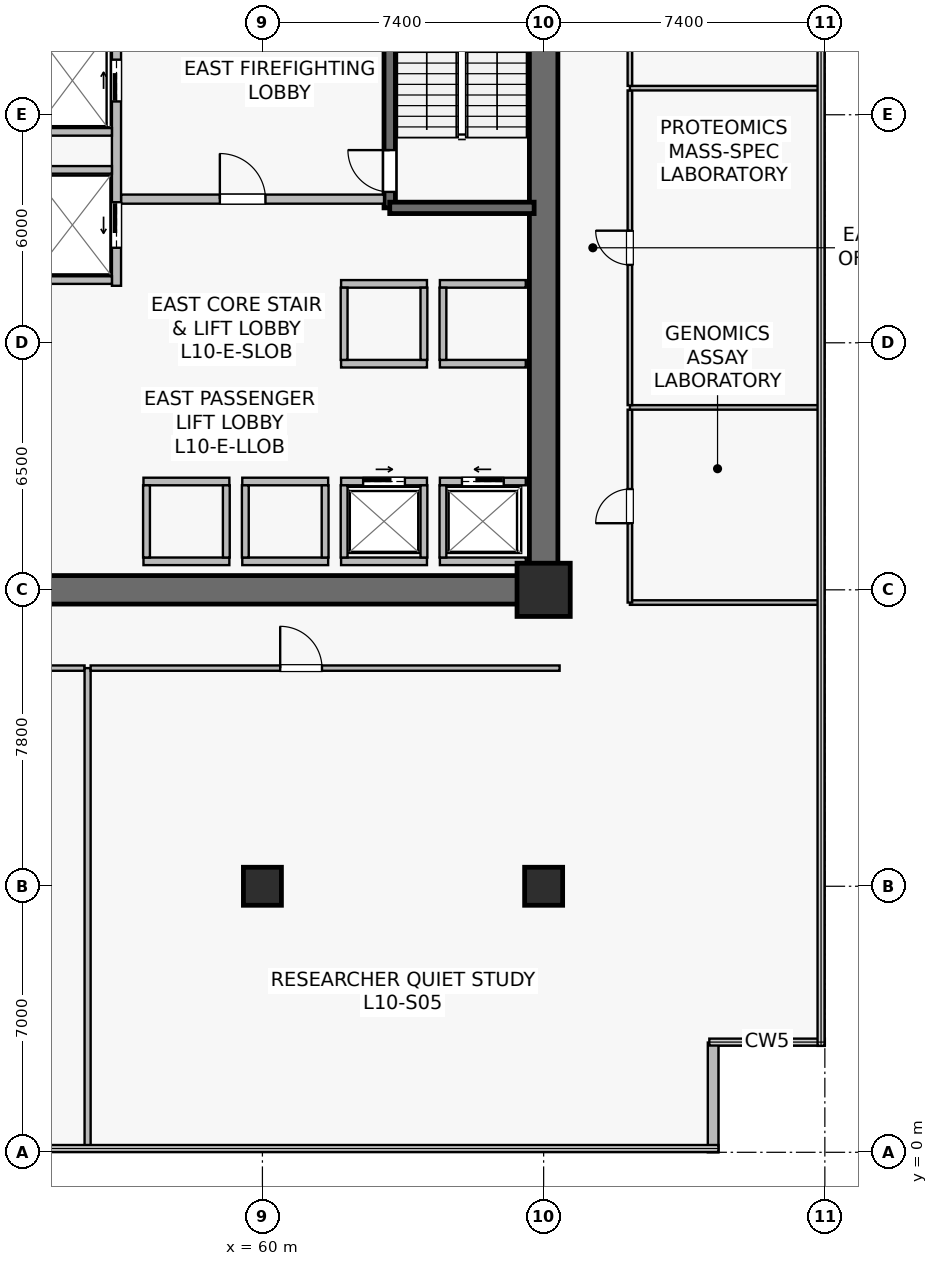
"""IFC4 building model, lengths in metres.
Left out: names, types, materials, properties, quantities, classifications, styles, units other than length and angle.
Written with IfcOpenShell. Run it as: python <this file> out.ifc"""

import sys

from ifc_helpers import new_model, si_unit, direction, frame, frame_2d, origin, origin_2d, place, context, subcontext, project, spatial, rectangle, extrude, source, transform, mapped, element, fill, save


model = new_model("IFC4")
c1 = context("Model", 3, precision=1e-05, world=origin(), true_north=direction((0.0, 1.0)))
c2 = subcontext(c1, "Body", "Model", "MODEL_VIEW")
j1 = project(units=[si_unit("LENGTHUNIT", "METRE"), si_unit("PLANEANGLEUNIT", "RADIAN")], contexts=[c1])
p1 = place(None, origin())
s1 = spatial("IfcSite", under=j1, at=p1, CompositionType="ELEMENT")
p2 = place(p1, origin())
s2 = spatial("IfcBuilding", under=s1, at=p2, CompositionType="ELEMENT")
p3 = place(p2, frame((0.0, 0.0, 41.6)))
s3 = spatial("IfcBuildingStorey", under=s2, at=p3, CompositionType="ELEMENT", Elevation=41.6)
p4 = place(p3, frame((52.225, 14.8, 0.0), z_axis=(0.0, 0.0, 1.0), x_axis=(1.0, 0.0, 0.0)))
e1 = element("IfcWall", 1, at=p4, inside=s3, PredefinedType="SHEAR", context=c2, shape_type="SweptSolid", body=[
    extrude(rectangle(XDim=15.55, YDim=0.75, at=frame_2d((7.775, 0.0))), origin(), (0.0, 0.0, 1.0), 3.78),
])
p5 = place(p3, frame((67.4, 15.175, 0.0), z_axis=(0.0, 0.0, 1.0), x_axis=(0.0, 1.0, 0.0)))
e2 = element("IfcWall", 2, at=p5, inside=s3, PredefinedType="SHEAR", context=c2, shape_type="SweptSolid", body=[
    extrude(rectangle(XDim=18.25, YDim=0.75, at=frame_2d((9.125, 0.0))), origin(), (0.0, 0.0, 1.0), 3.78),
])
p6 = place(p3, frame((63.35, 24.85, 0.0), z_axis=(0.0, 0.0, 1.0), x_axis=(0.0, 1.0, 0.0)))
e3 = element("IfcWall", 3, at=p6, inside=s3, PredefinedType="SHEAR", context=c2, shape_type="SweptSolid", body=[
    extrude(rectangle(XDim=8.63, YDim=0.3, at=frame_2d((4.315, 0.0))), origin(), (0.0, 0.0, 1.0), 3.78),
])
p7 = place(p6, frame((0.42, 0.0, 0.0)))
e4 = element("IfcOpeningElement", 4, at=p7, cuts=e3, PredefinedType="OPENING", context=c2, shape_type="SweptSolid", body=[
    extrude(rectangle(XDim=1.1, YDim=2.15, at=frame_2d((0.55, 1.075))), frame((0.0, 0.16, 0.0), z_axis=(0.0, -1.0, 0.0), x_axis=(1.0, 0.0, 0.0)), (0.0, 0.0, 1.0), 0.32),
])
p8 = place(p3, frame((63.35, 24.85, 0.0), z_axis=(0.0, 0.0, 1.0), x_axis=(1.0, 0.0, 0.0)))
e5 = element("IfcWall", 5, at=p8, inside=s3, PredefinedType="SHEAR", context=c2, shape_type="SweptSolid", body=[
    extrude(rectangle(XDim=3.8, YDim=0.3, at=frame_2d((1.9, 0.0))), origin(), (0.0, 0.0, 1.0), 3.78),
])
m1 = source(origin(), c2, "Body", "SweptSolid", [
    extrude(rectangle(XDim=1.0, YDim=1.0, at=origin_2d()), origin(), (0.0, 0.0, 1.0), 4.1),
])
p9 = place(p3, frame((60.0, 7.0, 0.0), z_axis=(0.0, 0.0, 1.0), x_axis=(1.0, 0.0, 0.0)))
e6 = element("IfcColumn", 6, at=p9, inside=s3, PredefinedType="COLUMN", context=c2, shape_type="MappedRepresentation", body=[
    mapped(m1, transform((0.0, 0.0, 0.0), scale=1.0)),
])
m2 = source(origin(), c2, "Body", "SweptSolid", [
    extrude(rectangle(XDim=1.4, YDim=1.4, at=origin_2d()), origin(), (0.0, 0.0, 1.0), 4.1),
])
p10 = place(p3, frame((67.4, 14.8, 0.0), z_axis=(0.0, 0.0, 1.0), x_axis=(1.0, 0.0, 0.0)))
e7 = element("IfcColumn", 7, at=p10, inside=s3, PredefinedType="COLUMN", context=c2, shape_type="MappedRepresentation", body=[
    mapped(m2, transform((0.0, 0.0, 0.0), scale=1.0)),
])
p11 = place(p3, frame((67.4, 7.0, 0.0), z_axis=(0.0, 0.0, 1.0), x_axis=(1.0, 0.0, 0.0)))
e8 = element("IfcColumn", 8, at=p11, inside=s3, PredefinedType="COLUMN", context=c2, shape_type="MappedRepresentation", body=[
    mapped(m1, transform((0.0, 0.0, 0.0), scale=1.0)),
])
p12 = place(p3, frame((71.86, 0.0, 0.0), z_axis=(0.0, 0.0, 1.0), x_axis=(0.0, 1.0, 0.0)))
e9 = element("IfcWall", 9, at=p12, inside=s3, PredefinedType="STANDARD", context=c2, shape_type="SweptSolid", body=[
    extrude(rectangle(XDim=2.888, YDim=0.28, at=frame_2d((1.444, 0.0))), origin(), (0.0, 0.0, 1.0), 3.78),
])
p13 = place(p3, frame((56.28, 25.08, 0.0), z_axis=(0.0, 0.0, 1.0), x_axis=(1.0, 0.0, 0.0)))
e10 = element("IfcWall", 10, at=p13, inside=s3, PredefinedType="SOLIDWALL", context=c2, shape_type="SweptSolid", body=[
    extrude(rectangle(XDim=6.92, YDim=0.24, at=frame_2d((3.46, 0.0))), origin(), (0.0, 0.0, 1.0), 3.065),
])
p14 = place(p13, frame((2.6, 0.0, 0.0)))
e11 = element("IfcOpeningElement", 11, at=p14, cuts=e10, PredefinedType="OPENING", context=c2, shape_type="SweptSolid", body=[
    extrude(rectangle(XDim=1.2, YDim=2.16, at=frame_2d((0.6, 1.08))), frame((0.0, 0.13, 0.0), z_axis=(0.0, -1.0, 0.0), x_axis=(1.0, 0.0, 0.0)), (0.0, 0.0, 1.0), 0.26),
])
p15 = place(p3, frame((56.16, 22.8, 0.0), z_axis=(0.0, 0.0, 1.0), x_axis=(0.0, 1.0, 0.0)))
e12 = element("IfcWall", 12, at=p15, inside=s3, PredefinedType="SOLIDWALL", context=c2, shape_type="SweptSolid", body=[
    extrude(rectangle(XDim=6.85, YDim=0.24, at=frame_2d((3.425, 0.0))), origin(), (0.0, 0.0, 1.0), 2.865),
])
p16 = place(p15, frame((4.85, 0.0, 0.0)))
e13 = element("IfcOpeningElement", 13, at=p16, cuts=e12, PredefinedType="OPENING", context=c2, shape_type="SweptSolid", body=[
    extrude(rectangle(XDim=1.1, YDim=2.22, at=frame_2d((0.55, 1.11))), frame((0.0, 0.13, 0.0), z_axis=(0.0, -1.0, 0.0), x_axis=(1.0, 0.0, 0.0)), (0.0, 0.0, 1.0), 0.26),
])
p17 = place(p15, frame((1.0, 0.0, 0.0)))
e14 = element("IfcOpeningElement", 14, at=p17, cuts=e12, PredefinedType="OPENING", context=c2, shape_type="SweptSolid", body=[
    extrude(rectangle(XDim=1.2, YDim=2.22, at=frame_2d((0.6, 1.11))), frame((0.0, 0.13, 0.0), z_axis=(0.0, -1.0, 0.0), x_axis=(1.0, 0.0, 0.0)), (0.0, 0.0, 1.0), 0.26),
])
p18 = place(p3, frame((64.67, 17.65, 0.0), z_axis=(0.0, 0.0, 1.0), x_axis=(1.0, 0.0, 0.0)))
e15 = element("IfcWall", 15, at=p18, inside=s3, PredefinedType="SOLIDWALL", context=c2, shape_type="SweptSolid", body=[
    extrude(rectangle(XDim=2.26, YDim=0.2, at=frame_2d((1.13, 0.0))), origin(), (0.0, 0.0, 1.0), 3.78),
])
p19 = place(p18, frame((0.58, 0.0, 0.0)))
e16 = element("IfcOpeningElement", 16, at=p19, cuts=e15, PredefinedType="OPENING", context=c2, shape_type="SweptSolid", body=[
    extrude(rectangle(XDim=1.1, YDim=2.22, at=frame_2d((0.55, 1.11))), frame((0.0, 0.11, 0.0), z_axis=(0.0, -1.0, 0.0), x_axis=(1.0, 0.0, 0.0)), (0.0, 0.0, 1.0), 0.22),
])
p20 = place(p3, frame((64.67, 15.55, 0.0), z_axis=(0.0, 0.0, 1.0), x_axis=(1.0, 0.0, 0.0)))
e17 = element("IfcWall", 17, at=p20, inside=s3, PredefinedType="SOLIDWALL", context=c2, shape_type="SweptSolid", body=[
    extrude(rectangle(XDim=2.26, YDim=0.2, at=frame_2d((1.13, 0.0))), origin(), (0.0, 0.0, 1.0), 3.78),
])
p21 = place(p3, frame((64.75, 15.65, 0.0), z_axis=(0.0, 0.0, 1.0), x_axis=(0.0, 1.0, 0.0)))
e18 = element("IfcWall", 18, at=p21, inside=s3, PredefinedType="SOLIDWALL", context=c2, shape_type="SweptSolid", body=[
    extrude(rectangle(XDim=1.9, YDim=0.18, at=frame_2d((0.95, 0.0))), origin(), (0.0, 0.0, 1.0), 3.78),
])
p22 = place(p3, frame((62.07, 17.65, 0.0), z_axis=(0.0, 0.0, 1.0), x_axis=(1.0, 0.0, 0.0)))
e19 = element("IfcWall", 19, at=p22, inside=s3, PredefinedType="SOLIDWALL", context=c2, shape_type="SweptSolid", body=[
    extrude(rectangle(XDim=2.26, YDim=0.2, at=frame_2d((1.13, 0.0))), origin(), (0.0, 0.0, 1.0), 3.78),
])
p23 = place(p22, frame((0.58, 0.0, 0.0)))
e20 = element("IfcOpeningElement", 20, at=p23, cuts=e19, PredefinedType="OPENING", context=c2, shape_type="SweptSolid", body=[
    extrude(rectangle(XDim=1.1, YDim=2.22, at=frame_2d((0.55, 1.11))), frame((0.0, 0.11, 0.0), z_axis=(0.0, -1.0, 0.0), x_axis=(1.0, 0.0, 0.0)), (0.0, 0.0, 1.0), 0.22),
])
p24 = place(p3, frame((62.07, 15.55, 0.0), z_axis=(0.0, 0.0, 1.0), x_axis=(1.0, 0.0, 0.0)))
e21 = element("IfcWall", 21, at=p24, inside=s3, PredefinedType="SOLIDWALL", context=c2, shape_type="SweptSolid", body=[
    extrude(rectangle(XDim=2.26, YDim=0.2, at=frame_2d((1.13, 0.0))), origin(), (0.0, 0.0, 1.0), 3.78),
])
for number, where, z_axis, x_axis in (
    (22, (62.15, 15.65, 0.0), (0.0, 0.0, 1.0), (0.0, 1.0, 0.0)),
    (23, (64.25, 15.65, 0.0), (0.0, 0.0, 1.0), (0.0, 1.0, 0.0)),
):
    element("IfcWall", number, at=place(p3, frame(where, z_axis=z_axis, x_axis=x_axis)), inside=s3, PredefinedType="SOLIDWALL", context=c2, shape_type="SweptSolid", body=[
        extrude(rectangle(XDim=1.9, YDim=0.18, at=frame_2d((0.95, 0.0))), origin(), (0.0, 0.0, 1.0), 3.78),
    ])
for number, where, z_axis, x_axis in (
    (24, (59.47, 17.65, 0.0), (0.0, 0.0, 1.0), (1.0, 0.0, 0.0)),
    (25, (59.47, 15.55, 0.0), (0.0, 0.0, 1.0), (1.0, 0.0, 0.0)),
):
    element("IfcWall", number, at=place(p3, frame(where, z_axis=z_axis, x_axis=x_axis)), inside=s3, PredefinedType="SOLIDWALL", context=c2, shape_type="SweptSolid", body=[
        extrude(rectangle(XDim=2.26, YDim=0.2, at=frame_2d((1.13, 0.0))), origin(), (0.0, 0.0, 1.0), 3.065),
    ])
for number, where, z_axis, x_axis in (
    (26, (59.55, 15.65, 0.0), (0.0, 0.0, 1.0), (0.0, 1.0, 0.0)),
    (27, (61.65, 15.65, 0.0), (0.0, 0.0, 1.0), (0.0, 1.0, 0.0)),
):
    element("IfcWall", number, at=place(p3, frame(where, z_axis=z_axis, x_axis=x_axis)), inside=s3, PredefinedType="SOLIDWALL", context=c2, shape_type="SweptSolid", body=[
        extrude(rectangle(XDim=1.9, YDim=0.18, at=frame_2d((0.95, 0.0))), origin(), (0.0, 0.0, 1.0), 3.78),
    ])
for number, where, z_axis, x_axis in (
    (28, (56.87, 17.65, 0.0), (0.0, 0.0, 1.0), (1.0, 0.0, 0.0)),
    (29, (56.87, 15.55, 0.0), (0.0, 0.0, 1.0), (1.0, 0.0, 0.0)),
):
    element("IfcWall", number, at=place(p3, frame(where, z_axis=z_axis, x_axis=x_axis)), inside=s3, PredefinedType="SOLIDWALL", context=c2, shape_type="SweptSolid", body=[
        extrude(rectangle(XDim=2.26, YDim=0.2, at=frame_2d((1.13, 0.0))), origin(), (0.0, 0.0, 1.0), 3.78),
    ])
for number, where, z_axis, x_axis in (
    (30, (56.95, 15.65, 0.0), (0.0, 0.0, 1.0), (0.0, 1.0, 0.0)),
    (31, (59.05, 15.65, 0.0), (0.0, 0.0, 1.0), (0.0, 1.0, 0.0)),
):
    element("IfcWall", number, at=place(p3, frame(where, z_axis=z_axis, x_axis=x_axis)), inside=s3, PredefinedType="SOLIDWALL", context=c2, shape_type="SweptSolid", body=[
        extrude(rectangle(XDim=1.9, YDim=0.18, at=frame_2d((0.95, 0.0))), origin(), (0.0, 0.0, 1.0), 3.78),
    ])
for number, where, z_axis, x_axis in (
    (32, (64.67, 20.75, 0.0), (0.0, 0.0, 1.0), (1.0, 0.0, 0.0)),
    (33, (64.67, 22.85, 0.0), (0.0, 0.0, 1.0), (1.0, 0.0, 0.0)),
):
    element("IfcWall", number, at=place(p3, frame(where, z_axis=z_axis, x_axis=x_axis)), inside=s3, PredefinedType="SOLIDWALL", context=c2, shape_type="SweptSolid", body=[
        extrude(rectangle(XDim=2.26, YDim=0.2, at=frame_2d((1.13, 0.0))), origin(), (0.0, 0.0, 1.0), 3.78),
    ])
p25 = place(p3, frame((64.75, 20.85, 0.0), z_axis=(0.0, 0.0, 1.0), x_axis=(0.0, 1.0, 0.0)))
e34 = element("IfcWall", 34, at=p25, inside=s3, PredefinedType="SOLIDWALL", context=c2, shape_type="SweptSolid", body=[
    extrude(rectangle(XDim=1.9, YDim=0.18, at=frame_2d((0.95, 0.0))), origin(), (0.0, 0.0, 1.0), 3.78),
])
for number, where, z_axis, x_axis in (
    (35, (62.07, 20.75, 0.0), (0.0, 0.0, 1.0), (1.0, 0.0, 0.0)),
    (36, (62.07, 22.85, 0.0), (0.0, 0.0, 1.0), (1.0, 0.0, 0.0)),
):
    element("IfcWall", number, at=place(p3, frame(where, z_axis=z_axis, x_axis=x_axis)), inside=s3, PredefinedType="SOLIDWALL", context=c2, shape_type="SweptSolid", body=[
        extrude(rectangle(XDim=2.26, YDim=0.2, at=frame_2d((1.13, 0.0))), origin(), (0.0, 0.0, 1.0), 3.78),
    ])
for number, where, z_axis, x_axis in (
    (37, (62.15, 20.85, 0.0), (0.0, 0.0, 1.0), (0.0, 1.0, 0.0)),
    (38, (64.25, 20.85, 0.0), (0.0, 0.0, 1.0), (0.0, 1.0, 0.0)),
):
    element("IfcWall", number, at=place(p3, frame(where, z_axis=z_axis, x_axis=x_axis)), inside=s3, PredefinedType="SOLIDWALL", context=c2, shape_type="SweptSolid", body=[
        extrude(rectangle(XDim=1.9, YDim=0.18, at=frame_2d((0.95, 0.0))), origin(), (0.0, 0.0, 1.0), 3.78),
    ])
p26 = place(p3, frame((53.85, 26.85, 0.0), z_axis=(0.0, 0.0, 1.0), x_axis=(1.0, 0.0, 0.0)))
e39 = element("IfcWall", 39, at=p26, inside=s3, PredefinedType="SOLIDWALL", context=c2, shape_type="SweptSolid", body=[
    extrude(rectangle(XDim=2.19, YDim=0.2, at=frame_2d((1.095, 0.0))), origin(), (0.0, 0.0, 1.0), 3.177),
])
for number, where, z_axis, x_axis in (
    (40, (53.85, 25.85, 0.0), (0.0, 0.0, 1.0), (1.0, 0.0, 0.0)),
    (41, (53.85, 22.95, 0.0), (0.0, 0.0, 1.0), (1.0, 0.0, 0.0)),
):
    element("IfcWall", number, at=place(p3, frame(where, z_axis=z_axis, x_axis=x_axis)), inside=s3, PredefinedType="SOLIDWALL", context=c2, shape_type="SweptSolid", body=[
        extrude(rectangle(XDim=2.19, YDim=0.2, at=frame_2d((1.095, 0.0))), origin(), (0.0, 0.0, 1.0), 3.78),
    ])
p27 = place(p3, frame((38.88, 12.74, 0.0), z_axis=(0.0, 0.0, 1.0), x_axis=(1.0, 0.0, 0.0)))
e42 = element("IfcWall", 42, at=p27, inside=s3, PredefinedType="PARTITIONING", context=c2, shape_type="SweptSolid", body=[
    extrude(rectangle(XDim=16.44, YDim=0.14, at=frame_2d((8.22, 0.0))), origin(), (0.0, 0.0, 1.0), 3.065),
])
p28 = place(p27, frame((8.548, 0.0, 0.0)))
e43 = element("IfcOpeningElement", 43, at=p28, cuts=e42, PredefinedType="OPENING", context=c2, shape_type="SweptSolid", body=[
    extrude(rectangle(XDim=1.1, YDim=2.18, at=frame_2d((0.55, 1.09))), frame((0.0, 0.08, 0.0), z_axis=(0.0, -1.0, 0.0), x_axis=(1.0, 0.0, 0.0)), (0.0, 0.0, 1.0), 0.16),
])
p29 = place(p3, frame((55.4, 0.11, 0.0), z_axis=(0.0, 0.0, 1.0), x_axis=(0.0, 1.0, 0.0)))
e44 = element("IfcWall", 44, at=p29, inside=s3, PredefinedType="PARTITIONING", context=c2, shape_type="SweptSolid", body=[
    extrude(rectangle(XDim=12.63, YDim=0.16, at=frame_2d((6.315, 0.0))), origin(), (0.0, 0.0, 1.0), 3.015),
])
p30 = place(p3, frame((55.48, 12.74, 0.0), z_axis=(0.0, 0.0, 1.0), x_axis=(1.0, 0.0, 0.0)))
e45 = element("IfcWall", 45, at=p30, inside=s3, PredefinedType="PARTITIONING", context=c2, shape_type="SweptSolid", body=[
    extrude(rectangle(XDim=12.34, YDim=0.14, at=frame_2d((6.17, 0.0))), origin(), (0.0, 0.0, 1.0), 3.065),
])
p31 = place(p30, frame((4.988, 0.0, 0.0)))
e46 = element("IfcOpeningElement", 46, at=p31, cuts=e45, PredefinedType="OPENING", context=c2, shape_type="SweptSolid", body=[
    extrude(rectangle(XDim=1.1, YDim=2.18, at=frame_2d((0.55, 1.09))), frame((0.0, 0.08, 0.0), z_axis=(0.0, -1.0, 0.0), x_axis=(1.0, 0.0, 0.0)), (0.0, 0.0, 1.0), 0.16),
])
p32 = place(p3, frame((69.67, 14.465, 0.0), z_axis=(0.0, 0.0, 1.0), x_axis=(1.0, 0.0, 0.0)))
e47 = element("IfcWall", 47, at=p32, inside=s3, PredefinedType="PARTITIONING", context=c2, shape_type="SweptSolid", body=[
    extrude(rectangle(XDim=5.02, YDim=0.12, at=frame_2d((2.51, 0.0))), origin(), (0.0, 0.0, 1.0), 3.78),
])
p33 = place(p3, frame((69.67, 14.465, 0.0), z_axis=(0.0, 0.0, 1.0), x_axis=(0.0, 1.0, 0.0)))
e48 = element("IfcWall", 48, at=p33, inside=s3, PredefinedType="PARTITIONING", context=c2, shape_type="SweptSolid", body=[
    extrude(rectangle(XDim=5.075, YDim=0.12, at=frame_2d((2.538, 0.0))), origin(), (0.0, 0.0, 1.0), 3.78),
])
p34 = place(p33, frame((2.087, 0.0, 0.0)))
e49 = element("IfcOpeningElement", 49, at=p34, cuts=e48, PredefinedType="OPENING", context=c2, shape_type="SweptSolid", body=[
    extrude(rectangle(XDim=0.9, YDim=2.1, at=frame_2d((0.45, 1.05))), frame((0.0, 0.07, 0.0), z_axis=(0.0, -1.0, 0.0), x_axis=(1.0, 0.0, 0.0)), (0.0, 0.0, 1.0), 0.14),
])
p35 = place(p3, frame((69.67, 19.6, 0.0), z_axis=(0.0, 0.0, 1.0), x_axis=(1.0, 0.0, 0.0)))
e50 = element("IfcWall", 50, at=p35, inside=s3, PredefinedType="PARTITIONING", context=c2, shape_type="SweptSolid", body=[
    extrude(rectangle(XDim=5.02, YDim=0.12, at=frame_2d((2.51, 0.0))), origin(), (0.0, 0.0, 1.0), 3.78),
])
p36 = place(p3, frame((69.67, 19.66, 0.0), z_axis=(0.0, 0.0, 1.0), x_axis=(0.0, 1.0, 0.0)))
e51 = element("IfcWall", 51, at=p36, inside=s3, PredefinedType="PARTITIONING", context=c2, shape_type="SweptSolid", body=[
    extrude(rectangle(XDim=8.28, YDim=0.12, at=frame_2d((4.14, 0.0))), origin(), (0.0, 0.0, 1.0), 3.78),
])
p37 = place(p36, frame((3.69, 0.0, 0.0)))
e52 = element("IfcOpeningElement", 52, at=p37, cuts=e51, PredefinedType="OPENING", context=c2, shape_type="SweptSolid", body=[
    extrude(rectangle(XDim=0.9, YDim=2.1, at=frame_2d((0.45, 1.05))), frame((0.0, 0.07, 0.0), z_axis=(0.0, -1.0, 0.0), x_axis=(1.0, 0.0, 0.0)), (0.0, 0.0, 1.0), 0.14),
])
p38 = place(p3, frame((69.67, 28.0, 0.0), z_axis=(0.0, 0.0, 1.0), x_axis=(1.0, 0.0, 0.0)))
e53 = element("IfcWall", 53, at=p38, inside=s3, PredefinedType="PARTITIONING", context=c2, shape_type="SweptSolid", body=[
    extrude(rectangle(XDim=5.02, YDim=0.12, at=frame_2d((2.51, 0.0))), origin(), (0.0, 0.0, 1.0), 3.78),
])
p39 = place(p3, frame((69.67, 28.06, 0.0), z_axis=(0.0, 0.0, 1.0), x_axis=(0.0, 1.0, 0.0)))
e54 = element("IfcWall", 54, at=p39, inside=s3, PredefinedType="PARTITIONING", context=c2, shape_type="SweptSolid", body=[
    extrude(rectangle(XDim=6.075, YDim=0.12, at=frame_2d((3.038, 0.0))), origin(), (0.0, 0.0, 1.0), 3.78),
])
p40 = place(p39, frame((2.587, 0.0, 0.0)))
e55 = element("IfcOpeningElement", 55, at=p40, cuts=e54, PredefinedType="OPENING", context=c2, shape_type="SweptSolid", body=[
    extrude(rectangle(XDim=0.9, YDim=2.1, at=frame_2d((0.45, 1.05))), frame((0.0, 0.07, 0.0), z_axis=(0.0, -1.0, 0.0), x_axis=(1.0, 0.0, 0.0)), (0.0, 0.0, 1.0), 0.14),
])
m3 = source(origin(), c2, "Body", "SweptSolid", [
    extrude(rectangle(XDim=1.1, YDim=2.15, at=frame_2d((0.55, 1.075))), frame((0.0, 0.025, 0.0), z_axis=(0.0, -1.0, 0.0), x_axis=(1.0, 0.0, 0.0)), (0.0, 0.0, 1.0), 0.05),
])
p41 = place(p7, origin())
e56 = element("IfcDoor", 56, at=p41, inside=s3, OperationType="SINGLE_SWING_RIGHT", PredefinedType="DOOR", context=c2, shape_type="MappedRepresentation", body=[
    mapped(m3, transform((0.0, 0.0, 0.0), scale=1.0)),
])
fill(e4, e56)
m4 = source(origin(), c2, "Body", "SweptSolid", [
    extrude(rectangle(XDim=1.2, YDim=2.16, at=frame_2d((0.6, 1.08))), frame((0.0, 0.025, 0.0), z_axis=(0.0, -1.0, 0.0), x_axis=(1.0, 0.0, 0.0)), (0.0, 0.0, 1.0), 0.05),
])
p42 = place(p14, origin())
e57 = element("IfcDoor", 57, at=p42, inside=s3, OperationType="SINGLE_SWING_LEFT", PredefinedType="DOOR", context=c2, shape_type="MappedRepresentation", body=[
    mapped(m4, transform((0.0, 0.0, 0.0), scale=1.0)),
])
fill(e11, e57)
m5 = source(origin(), c2, "Body", "SweptSolid", [
    extrude(rectangle(XDim=1.1, YDim=2.22, at=frame_2d((0.55, 1.11))), frame((0.0, 0.025, 0.0), z_axis=(0.0, -1.0, 0.0), x_axis=(1.0, 0.0, 0.0)), (0.0, 0.0, 1.0), 0.05),
])
p43 = place(p19, origin())
e58 = element("IfcDoor", 58, at=p43, inside=s3, OperationType="SLIDING_TO_LEFT", PredefinedType="USERDEFINED", context=c2, shape_type="MappedRepresentation", body=[
    mapped(m5, transform((0.0, 0.0, 0.0), scale=1.0)),
])
fill(e16, e58)
p44 = place(p23, origin())
e59 = element("IfcDoor", 59, at=p44, inside=s3, OperationType="SLIDING_TO_RIGHT", PredefinedType="USERDEFINED", context=c2, shape_type="MappedRepresentation", body=[
    mapped(m5, transform((0.0, 0.0, 0.0), scale=1.0)),
])
fill(e20, e59)
p45 = place(p16, origin())
e60 = element("IfcDoor", 60, at=p45, inside=s3, OperationType="SLIDING_TO_RIGHT", PredefinedType="USERDEFINED", context=c2, shape_type="MappedRepresentation", body=[
    mapped(m5, transform((0.0, 0.0, 0.0), scale=1.0)),
])
fill(e13, e60)
m6 = source(origin(), c2, "Body", "SweptSolid", [
    extrude(rectangle(XDim=1.2, YDim=2.22, at=frame_2d((0.6, 1.11))), frame((0.0, 0.025, 0.0), z_axis=(0.0, -1.0, 0.0), x_axis=(1.0, 0.0, 0.0)), (0.0, 0.0, 1.0), 0.05),
])
p46 = place(p17, origin())
e61 = element("IfcDoor", 61, at=p46, inside=s3, OperationType="SLIDING_TO_LEFT", PredefinedType="USERDEFINED", context=c2, shape_type="MappedRepresentation", body=[
    mapped(m6, transform((0.0, 0.0, 0.0), scale=1.0)),
])
fill(e14, e61)
m7 = source(origin(), c2, "Body", "SweptSolid", [
    extrude(rectangle(XDim=1.1, YDim=2.18, at=frame_2d((0.55, 1.09))), frame((0.0, 0.025, 0.0), z_axis=(0.0, -1.0, 0.0), x_axis=(1.0, 0.0, 0.0)), (0.0, 0.0, 1.0), 0.05),
])
p47 = place(p31, origin())
e62 = element("IfcDoor", 62, at=p47, inside=s3, OperationType="SINGLE_SWING_LEFT", PredefinedType="DOOR", context=c2, shape_type="MappedRepresentation", body=[
    mapped(m7, transform((0.0, 0.0, 0.0), scale=1.0)),
])
fill(e46, e62)
m8 = source(origin(), c2, "Body", "SweptSolid", [
    extrude(rectangle(XDim=0.9, YDim=2.1, at=frame_2d((0.45, 1.05))), frame((0.0, 0.025, 0.0), z_axis=(0.0, -1.0, 0.0), x_axis=(1.0, 0.0, 0.0)), (0.0, 0.0, 1.0), 0.05),
])
p48 = place(p34, origin())
e63 = element("IfcDoor", 63, at=p48, inside=s3, OperationType="SINGLE_SWING_LEFT", PredefinedType="DOOR", context=c2, shape_type="MappedRepresentation", body=[
    mapped(m8, transform((0.0, 0.0, 0.0), scale=1.0)),
])
fill(e49, e63)
p49 = place(p37, origin())
e64 = element("IfcDoor", 64, at=p49, inside=s3, OperationType="SINGLE_SWING_RIGHT", PredefinedType="DOOR", context=c2, shape_type="MappedRepresentation", body=[
    mapped(m8, transform((0.0, 0.0, 0.0), scale=1.0)),
])
fill(e52, e64)
save(model, sys.argv[1])
